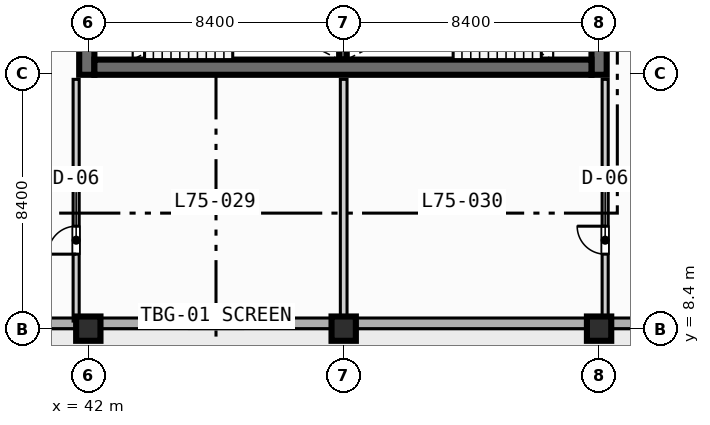
"""IFC4 building model, lengths in metres.
Left out: names, types, materials, properties, quantities, classifications, styles, units other than length and angle.
Written with IfcOpenShell. Run it as: python <this file> out.ifc"""

import sys

from ifc_helpers import new_model, si_unit, direction, frame, frame_2d, origin, origin_2d, place, context, subcontext, project, spatial, rectangle, extrude, element, fill, save


model = new_model("IFC4")
c1 = context("Model", 3, precision=1e-05, world=origin(), true_north=direction((0.0, 1.0)))
c2 = subcontext(c1, "Body", "Model", "MODEL_VIEW")
j1 = project(units=[si_unit("LENGTHUNIT", "METRE"), si_unit("PLANEANGLEUNIT", "RADIAN")], contexts=[c1])
p1 = place(None, origin())
s1 = spatial("IfcSite", under=j1, at=p1, CompositionType="ELEMENT")
p2 = place(p1, origin())
s2 = spatial("IfcBuilding", under=s1, at=p2, CompositionType="ELEMENT")
p3 = place(p2, frame((0.0, 0.0, 304.7)))
s3 = spatial("IfcBuildingStorey", under=s2, at=p3, CompositionType="ELEMENT", Elevation=304.7)
p4 = place(p3, frame((50.375, 17.25, 0.0), z_axis=(0.0, 0.0, 1.0), x_axis=(0.0, 1.0, 0.0)))
e1 = element("IfcWall", 1, at=p4, inside=s3, PredefinedType="SOLIDWALL", context=c2, shape_type="SweptSolid", body=[
    extrude(rectangle(XDim=3.5, YDim=0.25, at=frame_2d((1.75, 0.0))), origin(), (0.0, 0.0, 1.0), 3.67),
])
for number, where, z_axis, x_axis in (
    (2, (41.95, 16.75, 0.0), (0.0, 0.0, 1.0), (0.0, 1.0, 0.0)),
    (3, (58.8, 16.75, 0.0), (0.0, 0.0, 1.0), (0.0, 1.0, 0.0)),
):
    element("IfcWall", number, at=place(p3, frame(where, z_axis=z_axis, x_axis=x_axis)), inside=s3, PredefinedType="SHEAR", context=c2, shape_type="SweptSolid", body=[
        extrude(rectangle(XDim=1.25, YDim=0.5, at=frame_2d((0.625, 0.0))), origin(), (0.0, 0.0, 1.0), 3.67),
    ])
p5 = place(p3, frame((42.2, 17.0, 0.0), z_axis=(0.0, 0.0, 1.0), x_axis=(1.0, 0.0, 0.0)))
e4 = element("IfcWall", 4, at=p5, inside=s3, PredefinedType="SHEAR", context=c2, shape_type="SweptSolid", body=[
    extrude(rectangle(XDim=16.35, YDim=0.5, at=frame_2d((8.175, 0.0))), origin(), (0.0, 0.0, 1.0), 3.67),
])
for number, where, z_axis, x_axis in (
    (5, (42.0, 8.4, 0.0), (0.0, 0.0, 1.0), (1.0, 0.0, 0.0)),
    (6, (50.4, 8.4, 0.0), (0.0, 0.0, 1.0), (1.0, 0.0, 0.0)),
    (7, (58.8, 8.4, 0.0), (0.0, 0.0, 1.0), (1.0, 0.0, 0.0)),
):
    element("IfcColumn", number, at=place(p3, frame(where, z_axis=z_axis, x_axis=x_axis)), inside=s3, PredefinedType="COLUMN", context=c2, shape_type="SweptSolid", body=[
        extrude(rectangle(XDim=0.8, YDim=0.8, at=origin_2d()), origin(), (0.0, 0.0, 1.0), 3.9),
    ])
p6 = place(p3, frame((64.025, 8.575, 0.0), z_axis=(0.0, 0.0, 1.0), x_axis=(-1.0, 0.0, 0.0)))
e8 = element("IfcWall", 8, at=p6, inside=s3, PredefinedType="STANDARD", context=c2, shape_type="SweptSolid", body=[
    extrude(rectangle(XDim=52.45, YDim=0.35, at=frame_2d((26.225, 0.0))), origin(), (0.0, 0.0, 1.0), 3.67),
])
p7 = place(p6, frame((34.925, 0.0, 0.0)))
e9 = element("IfcOpeningElement", 9, at=p7, cuts=e8, PredefinedType="OPENING", context=c2, shape_type="SweptSolid", body=[
    extrude(rectangle(XDim=1.4, YDim=2.2, at=frame_2d((0.7, 1.1))), frame((0.0, 0.185, 0.0), z_axis=(0.0, -1.0, 0.0), x_axis=(1.0, 0.0, 0.0)), (0.0, 0.0, 1.0), 0.37),
])
p8 = place(p6, frame((25.025, 0.0, 0.85)))
e10 = element("IfcOpeningElement", 10, at=p8, cuts=e8, PredefinedType="OPENING", context=c2, shape_type="SweptSolid", body=[
    extrude(rectangle(XDim=2.4, YDim=1.95, at=frame_2d((1.2, 0.975))), frame((0.0, 0.185, 0.0), z_axis=(0.0, -1.0, 0.0), x_axis=(1.0, 0.0, 0.0)), (0.0, 0.0, 1.0), 0.37),
])
p9 = place(p6, frame((16.925, 0.0, 0.85)))
e11 = element("IfcOpeningElement", 11, at=p9, cuts=e8, PredefinedType="OPENING", context=c2, shape_type="SweptSolid", body=[
    extrude(rectangle(XDim=1.8, YDim=1.8, at=frame_2d((0.9, 0.9))), frame((0.0, 0.185, 0.0), z_axis=(0.0, -1.0, 0.0), x_axis=(1.0, 0.0, 0.0)), (0.0, 0.0, 1.0), 0.37),
])
p10 = place(p6, frame((47.925, 0.0, 0.85)))
e12 = element("IfcOpeningElement", 12, at=p10, cuts=e8, PredefinedType="OPENING", context=c2, shape_type="SweptSolid", body=[
    extrude(rectangle(XDim=1.8, YDim=1.8, at=frame_2d((0.9, 0.9))), frame((0.0, 0.185, 0.0), z_axis=(0.0, -1.0, 0.0), x_axis=(1.0, 0.0, 0.0)), (0.0, 0.0, 1.0), 0.37),
])
p11 = place(p3, frame((41.6, 8.65, 0.0), z_axis=(0.0, 0.0, 1.0), x_axis=(0.0, 1.0, 0.0)))
e13 = element("IfcWall", 13, at=p11, inside=s3, PredefinedType="PARTITIONING", context=c2, shape_type="SweptSolid", body=[
    extrude(rectangle(XDim=7.95, YDim=0.2, at=frame_2d((3.975, 0.0))), origin(), (0.0, 0.0, 1.0), 3.67),
])
p12 = place(p11, frame((2.2, 0.0, 0.0)))
e14 = element("IfcOpeningElement", 14, at=p12, cuts=e13, PredefinedType="OPENING", context=c2, shape_type="SweptSolid", body=[
    extrude(rectangle(XDim=0.92, YDim=2.1, at=frame_2d((0.46, 1.05))), frame((0.0, 0.11, 0.0), z_axis=(0.0, -1.0, 0.0), x_axis=(1.0, 0.0, 0.0)), (0.0, 0.0, 1.0), 0.22),
])
p13 = place(p3, frame((59.0, 8.65, 0.0), z_axis=(0.0, 0.0, 1.0), x_axis=(0.0, 1.0, 0.0)))
e15 = element("IfcWall", 15, at=p13, inside=s3, PredefinedType="PARTITIONING", context=c2, shape_type="SweptSolid", body=[
    extrude(rectangle(XDim=7.95, YDim=0.2, at=frame_2d((3.975, 0.0))), origin(), (0.0, 0.0, 1.0), 3.07),
])
p14 = place(p13, frame((2.2, 0.0, 0.0)))
e16 = element("IfcOpeningElement", 16, at=p14, cuts=e15, PredefinedType="OPENING", context=c2, shape_type="SweptSolid", body=[
    extrude(rectangle(XDim=0.92, YDim=2.1, at=frame_2d((0.46, 1.05))), frame((0.0, 0.11, 0.0), z_axis=(0.0, -1.0, 0.0), x_axis=(1.0, 0.0, 0.0)), (0.0, 0.0, 1.0), 0.22),
])
p15 = place(p3, frame((50.4, 8.65, 0.0), z_axis=(0.0, 0.0, 1.0), x_axis=(0.0, 1.0, 0.0)))
e17 = element("IfcWall", 17, at=p15, inside=s3, PredefinedType="PARTITIONING", context=c2, shape_type="SweptSolid", body=[
    extrude(rectangle(XDim=7.95, YDim=0.22, at=frame_2d((3.975, 0.0))), origin(), (0.0, 0.0, 1.0), 3.127),
])
p16 = place(p9, origin())
e18 = element("IfcWindow", 18, at=p16, inside=s3, PartitioningType="SINGLE_PANEL", PredefinedType="WINDOW", context=c2, shape_type="SweptSolid", body=[
    extrude(rectangle(XDim=1.8, YDim=1.8, at=frame_2d((0.9, 0.9))), frame((0.0, 0.03, 0.0), z_axis=(0.0, -1.0, 0.0), x_axis=(1.0, 0.0, 0.0)), (0.0, 0.0, 1.0), 0.06),
])
fill(e11, e18)
p17 = place(p12, origin())
e19 = element("IfcDoor", 19, at=p17, inside=s3, OperationType="SINGLE_SWING_LEFT", PredefinedType="DOOR", context=c2, shape_type="SweptSolid", body=[
    extrude(rectangle(XDim=0.92, YDim=2.1, at=frame_2d((0.46, 1.05))), frame((0.0, 0.025, 0.0), z_axis=(0.0, -1.0, 0.0), x_axis=(1.0, 0.0, 0.0)), (0.0, 0.0, 1.0), 0.05),
])
fill(e14, e19)
p18 = place(p14, origin())
e20 = element("IfcDoor", 20, at=p18, inside=s3, OperationType="SINGLE_SWING_RIGHT", PredefinedType="DOOR", context=c2, shape_type="SweptSolid", body=[
    extrude(rectangle(XDim=0.92, YDim=2.1, at=frame_2d((0.46, 1.05))), frame((0.0, 0.025, 0.0), z_axis=(0.0, -1.0, 0.0), x_axis=(1.0, 0.0, 0.0)), (0.0, 0.0, 1.0), 0.05),
])
fill(e16, e20)
save(model, sys.argv[1])
